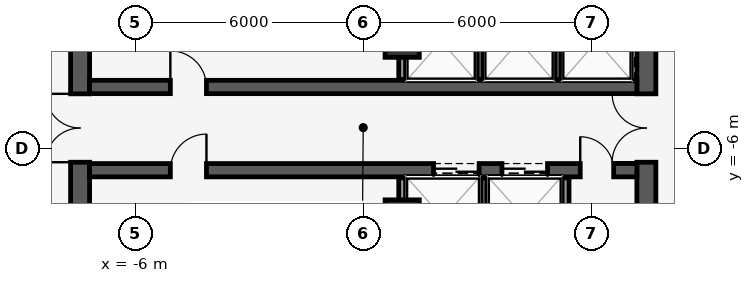
"""IFC4 building model, lengths in metres.
Left out: names, types, materials, properties, quantities, classifications, styles, units other than length and angle.
Written with IfcOpenShell. Run it as: python <this file> out.ifc"""

import sys

from ifc_helpers import new_model, si_unit, direction, frame, frame_2d, origin, origin_2d, place, context, subcontext, project, spatial, rectangle, extrude, element, fill, save


model = new_model("IFC4")
c1 = context("Model", 3, precision=1e-05, world=origin(), true_north=direction((0.0, 1.0)))
c2 = subcontext(c1, "Body", "Model", "MODEL_VIEW")
j1 = project(units=[si_unit("LENGTHUNIT", "METRE"), si_unit("PLANEANGLEUNIT", "RADIAN")], contexts=[c1])
p1 = place(None, origin())
s1 = spatial("IfcSite", under=j1, at=p1, CompositionType="ELEMENT")
p2 = place(p1, origin())
s2 = spatial("IfcBuilding", under=s1, at=p2, CompositionType="ELEMENT")
p3 = place(p2, frame((0.0, 0.0, 318.8)))
s3 = spatial("IfcBuildingStorey", under=s2, at=p3, CompositionType="ELEMENT", Elevation=318.8)
p4 = place(p3, frame((-7.45, -9.0, 0.0), z_axis=(0.0, 0.0, 1.0), x_axis=(0.0, 1.0, 0.0)))
e1 = element("IfcWall", 1, at=p4, inside=s3, PredefinedType="SHEAR", context=c2, shape_type="SweptSolid", body=[
    extrude(rectangle(XDim=9.1, YDim=0.5, at=frame_2d((4.55, 0.0))), origin(), (0.0, 0.0, 1.0), 4.32),
])
p5 = place(p4, frame((2.64, 0.0, 0.0)))
e2 = element("IfcOpeningElement", 2, at=p5, cuts=e1, PredefinedType="OPENING", context=c2, shape_type="SweptSolid", body=[
    extrude(rectangle(XDim=1.8, YDim=2.2, at=frame_2d((0.9, 1.1))), frame((0.0, 0.26, 0.0), z_axis=(0.0, -1.0, 0.0), x_axis=(1.0, 0.0, 0.0)), (0.0, 0.0, 1.0), 0.52),
])
p6 = place(p4, frame((7.55, 0.0, 0.0)))
e3 = element("IfcOpeningElement", 3, at=p6, cuts=e1, PredefinedType="OPENING", context=c2, shape_type="SweptSolid", body=[
    extrude(rectangle(XDim=1.2, YDim=2.15, at=frame_2d((0.6, 1.075))), frame((0.0, 0.26, 0.0), z_axis=(0.0, -1.0, 0.0), x_axis=(1.0, 0.0, 0.0)), (0.0, 0.0, 1.0), 0.52),
])
p7 = place(p3, frame((7.45, -9.0, 0.0), z_axis=(0.0, 0.0, 1.0), x_axis=(0.0, 1.0, 0.0)))
e4 = element("IfcWall", 4, at=p7, inside=s3, PredefinedType="SHEAR", context=c2, shape_type="SweptSolid", body=[
    extrude(rectangle(XDim=9.1, YDim=0.5, at=frame_2d((4.55, 0.0))), origin(), (0.0, 0.0, 1.0), 4.32),
])
p8 = place(p7, frame((2.64, 0.0, 0.0)))
e5 = element("IfcOpeningElement", 5, at=p8, cuts=e4, PredefinedType="OPENING", context=c2, shape_type="SweptSolid", body=[
    extrude(rectangle(XDim=1.8, YDim=2.2, at=frame_2d((0.9, 1.1))), frame((0.0, 0.26, 0.0), z_axis=(0.0, -1.0, 0.0), x_axis=(1.0, 0.0, 0.0)), (0.0, 0.0, 1.0), 0.52),
])
p9 = place(p7, frame((7.55, 0.0, 0.0)))
e6 = element("IfcOpeningElement", 6, at=p9, cuts=e4, PredefinedType="OPENING", context=c2, shape_type="SweptSolid", body=[
    extrude(rectangle(XDim=1.2, YDim=2.15, at=frame_2d((0.6, 1.075))), frame((0.0, 0.26, 0.0), z_axis=(0.0, -1.0, 0.0), x_axis=(1.0, 0.0, 0.0)), (0.0, 0.0, 1.0), 0.52),
])
p10 = place(p3, frame((-7.2, -4.38, 0.0), z_axis=(0.0, 0.0, 1.0), x_axis=(1.0, 0.0, 0.0)))
e7 = element("IfcWall", 7, at=p10, inside=s3, PredefinedType="SHEAR", context=c2, shape_type="SweptSolid", body=[
    extrude(rectangle(XDim=14.4, YDim=0.35, at=frame_2d((7.2, 0.0))), origin(), (0.0, 0.0, 1.0), 4.32),
])
p11 = place(p10, frame((2.125, 0.0, 0.0)))
e8 = element("IfcOpeningElement", 8, at=p11, cuts=e7, PredefinedType="OPENING", context=c2, shape_type="SweptSolid", body=[
    extrude(rectangle(XDim=0.95, YDim=2.15, at=frame_2d((0.475, 1.075))), frame((0.0, 0.185, 0.0), z_axis=(0.0, -1.0, 0.0), x_axis=(1.0, 0.0, 0.0)), (0.0, 0.0, 1.0), 0.37),
])
p12 = place(p3, frame((-7.2, -6.57, 0.0), z_axis=(0.0, 0.0, 1.0), x_axis=(1.0, 0.0, 0.0)))
e9 = element("IfcWall", 9, at=p12, inside=s3, PredefinedType="SHEAR", context=c2, shape_type="SweptSolid", body=[
    extrude(rectangle(XDim=14.4, YDim=0.35, at=frame_2d((7.2, 0.0))), origin(), (0.0, 0.0, 1.0), 4.32),
])
p13 = place(p12, frame((9.05, 0.0, 0.0)))
e10 = element("IfcOpeningElement", 10, at=p13, cuts=e9, PredefinedType="OPENING", context=c2, shape_type="SweptSolid", body=[
    extrude(rectangle(XDim=1.2, YDim=2.25, at=frame_2d((0.6, 1.125))), frame((0.0, 0.185, 0.0), z_axis=(0.0, -1.0, 0.0), x_axis=(1.0, 0.0, 0.0)), (0.0, 0.0, 1.0), 0.37),
])
p14 = place(p12, frame((10.85, 0.0, 0.0)))
e11 = element("IfcOpeningElement", 11, at=p14, cuts=e9, PredefinedType="OPENING", context=c2, shape_type="SweptSolid", body=[
    extrude(rectangle(XDim=1.2, YDim=2.25, at=frame_2d((0.6, 1.125))), frame((0.0, 0.185, 0.0), z_axis=(0.0, -1.0, 0.0), x_axis=(1.0, 0.0, 0.0)), (0.0, 0.0, 1.0), 0.37),
])
p15 = place(p12, frame((2.125, 0.0, 0.0)))
e12 = element("IfcOpeningElement", 12, at=p15, cuts=e9, PredefinedType="OPENING", context=c2, shape_type="SweptSolid", body=[
    extrude(rectangle(XDim=0.95, YDim=2.15, at=frame_2d((0.475, 1.075))), frame((0.0, 0.185, 0.0), z_axis=(0.0, -1.0, 0.0), x_axis=(1.0, 0.0, 0.0)), (0.0, 0.0, 1.0), 0.37),
])
p16 = place(p12, frame((12.91, 0.0, 0.0)))
e13 = element("IfcOpeningElement", 13, at=p16, cuts=e9, PredefinedType="OPENING", context=c2, shape_type="SweptSolid", body=[
    extrude(rectangle(XDim=0.88, YDim=2.15, at=frame_2d((0.44, 1.075))), frame((0.0, 0.185, 0.0), z_axis=(0.0, -1.0, 0.0), x_axis=(1.0, 0.0, 0.0)), (0.0, 0.0, 1.0), 0.37),
])
for number, where, z_axis, x_axis in (
    (14, (1.025, -3.15, 0.0), (0.0, 0.0, 1.0), (1.0, 0.0, 0.0)),
    (15, (1.025, -7.8, 0.0), (0.0, 0.0, 1.0), (1.0, 0.0, 0.0)),
):
    element("IfcColumn", number, at=place(p3, frame(where, z_axis=z_axis, x_axis=x_axis)), inside=s3, PredefinedType="COLUMN", context=c2, shape_type="SweptSolid", body=[
        extrude(rectangle(XDim=0.9, YDim=0.9, at=origin_2d()), origin(), (0.0, 0.0, 1.0), 4.6),
    ])
p17 = place(p3, frame((25.8, 9.083, 0.0), z_axis=(0.0, 0.0, 1.0), x_axis=(-0.55919392155, -0.829036885851, 0.0)))
e16 = element("IfcWall", 16, at=p17, inside=s3, PredefinedType="STANDARD", context=c2, shape_type="SweptSolid", body=[
    extrude(rectangle(XDim=43.915, YDim=0.28, at=frame_2d((21.958, 0.0))), origin(), (0.0, 0.0, 1.0), 4.32),
])
p18 = place(p17, frame((21.457, 0.0, 0.0)))
e17 = element("IfcOpeningElement", 17, at=p18, cuts=e16, PredefinedType="OPENING", context=c2, shape_type="SweptSolid", body=[
    extrude(rectangle(XDim=1.0, YDim=2.15, at=frame_2d((0.5, 1.075))), frame((0.0, 0.15, 0.0), z_axis=(0.0, -1.0, 0.0), x_axis=(1.0, 0.0, 0.0)), (0.0, 0.0, 1.0), 0.3),
])
p19 = place(p17, frame((4.257, 0.0, 0.85)))
e18 = element("IfcOpeningElement", 18, at=p19, cuts=e16, PredefinedType="OPENING", context=c2, shape_type="SweptSolid", body=[
    extrude(rectangle(XDim=1.8, YDim=2.4, at=frame_2d((0.9, 1.2))), frame((0.0, 0.15, 0.0), z_axis=(0.0, -1.0, 0.0), x_axis=(1.0, 0.0, 0.0)), (0.0, 0.0, 1.0), 0.3),
])
p20 = place(p17, frame((9.857, 0.0, 0.85)))
e19 = element("IfcOpeningElement", 19, at=p20, cuts=e16, PredefinedType="OPENING", context=c2, shape_type="SweptSolid", body=[
    extrude(rectangle(XDim=1.8, YDim=2.4, at=frame_2d((0.9, 1.2))), frame((0.0, 0.15, 0.0), z_axis=(0.0, -1.0, 0.0), x_axis=(1.0, 0.0, 0.0)), (0.0, 0.0, 1.0), 0.3),
])
p21 = place(p17, frame((32.257, 0.0, 0.85)))
e20 = element("IfcOpeningElement", 20, at=p21, cuts=e16, PredefinedType="OPENING", context=c2, shape_type="SweptSolid", body=[
    extrude(rectangle(XDim=1.8, YDim=2.4, at=frame_2d((0.9, 1.2))), frame((0.0, 0.15, 0.0), z_axis=(0.0, -1.0, 0.0), x_axis=(1.0, 0.0, 0.0)), (0.0, 0.0, 1.0), 0.3),
])
p22 = place(p17, frame((37.857, 0.0, 0.85)))
e21 = element("IfcOpeningElement", 21, at=p22, cuts=e16, PredefinedType="OPENING", context=c2, shape_type="SweptSolid", body=[
    extrude(rectangle(XDim=1.8, YDim=2.4, at=frame_2d((0.9, 1.2))), frame((0.0, 0.15, 0.0), z_axis=(0.0, -1.0, 0.0), x_axis=(1.0, 0.0, 0.0)), (0.0, 0.0, 1.0), 0.3),
])
p23 = place(p3, frame((-4.988, -26.865, 0.0), z_axis=(0.0, 0.0, 1.0), x_axis=(-0.431592936847, 0.902068476815, 0.0)))
e22 = element("IfcWall", 22, at=p23, inside=s3, PredefinedType="STANDARD", context=c2, shape_type="SweptSolid", body=[
    extrude(rectangle(XDim=43.18, YDim=0.28, at=frame_2d((21.59, 0.0))), origin(), (0.0, 0.0, 1.0), 4.32),
])
p24 = place(p23, frame((18.499, 0.0, 0.0)))
e23 = element("IfcOpeningElement", 23, at=p24, cuts=e22, PredefinedType="OPENING", context=c2, shape_type="SweptSolid", body=[
    extrude(rectangle(XDim=1.0, YDim=2.15, at=frame_2d((0.5, 1.075))), frame((0.0, 0.15, 0.0), z_axis=(0.0, -1.0, 0.0), x_axis=(1.0, 0.0, 0.0)), (0.0, 0.0, 1.0), 0.3),
])
p25 = place(p23, frame((9.49, 0.0, 0.85)))
e24 = element("IfcOpeningElement", 24, at=p25, cuts=e22, PredefinedType="OPENING", context=c2, shape_type="SweptSolid", body=[
    extrude(rectangle(XDim=1.8, YDim=2.4, at=frame_2d((0.9, 1.2))), frame((0.0, 0.15, 0.0), z_axis=(0.0, -1.0, 0.0), x_axis=(1.0, 0.0, 0.0)), (0.0, 0.0, 1.0), 0.3),
])
p26 = place(p23, frame((31.89, 0.0, 0.85)))
e25 = element("IfcOpeningElement", 25, at=p26, cuts=e22, PredefinedType="OPENING", context=c2, shape_type="SweptSolid", body=[
    extrude(rectangle(XDim=1.8, YDim=2.4, at=frame_2d((0.9, 1.2))), frame((0.0, 0.15, 0.0), z_axis=(0.0, -1.0, 0.0), x_axis=(1.0, 0.0, 0.0)), (0.0, 0.0, 1.0), 0.3),
])
p27 = place(p23, frame((37.49, 0.0, 0.85)))
e26 = element("IfcOpeningElement", 26, at=p27, cuts=e22, PredefinedType="OPENING", context=c2, shape_type="SweptSolid", body=[
    extrude(rectangle(XDim=1.8, YDim=2.4, at=frame_2d((0.9, 1.2))), frame((0.0, 0.15, 0.0), z_axis=(0.0, -1.0, 0.0), x_axis=(1.0, 0.0, 0.0)), (0.0, 0.0, 1.0), 0.3),
])
p28 = place(p3, frame((1.025, -4.18, 0.0), z_axis=(0.0, 0.0, 1.0), x_axis=(0.0, 1.0, 0.0)))
e27 = element("IfcWall", 27, at=p28, inside=s3, PredefinedType="PARTITIONING", context=c2, shape_type="SweptSolid", body=[
    extrude(rectangle(XDim=2.03, YDim=0.18, at=frame_2d((1.015, 0.0))), origin(), (0.0, 0.0, 1.0), 3.368),
])
for number, where, z_axis, x_axis in (
    (28, (3.075, -4.18, 0.0), (0.0, 0.0, 1.0), (0.0, 1.0, 0.0)),
    (29, (5.125, -4.18, 0.0), (0.0, 0.0, 1.0), (0.0, 1.0, 0.0)),
):
    element("IfcWall", number, at=place(p3, frame(where, z_axis=z_axis, x_axis=x_axis)), inside=s3, PredefinedType="PARTITIONING", context=c2, shape_type="SweptSolid", body=[
        extrude(rectangle(XDim=2.03, YDim=0.15, at=frame_2d((1.015, 0.0))), origin(), (0.0, 0.0, 1.0), 4.32),
    ])
p29 = place(p3, frame((1.025, -8.85, 0.0), z_axis=(0.0, 0.0, 1.0), x_axis=(0.0, 1.0, 0.0)))
e30 = element("IfcWall", 30, at=p29, inside=s3, PredefinedType="PARTITIONING", context=c2, shape_type="SweptSolid", body=[
    extrude(rectangle(XDim=2.08, YDim=0.18, at=frame_2d((1.04, 0.0))), origin(), (0.0, 0.0, 1.0), 3.368),
])
p30 = place(p3, frame((3.175, -8.85, 0.0), z_axis=(0.0, 0.0, 1.0), x_axis=(0.0, 1.0, 0.0)))
e31 = element("IfcWall", 31, at=p30, inside=s3, PredefinedType="PARTITIONING", context=c2, shape_type="SweptSolid", body=[
    extrude(rectangle(XDim=2.08, YDim=0.15, at=frame_2d((1.04, 0.0))), origin(), (0.0, 0.0, 1.0), 4.32),
])
p31 = place(p3, frame((5.325, -8.85, 0.0), z_axis=(0.0, 0.0, 1.0), x_axis=(0.0, 1.0, 0.0)))
e32 = element("IfcWall", 32, at=p31, inside=s3, PredefinedType="PARTITIONING", context=c2, shape_type="SweptSolid", body=[
    extrude(rectangle(XDim=2.08, YDim=0.18, at=frame_2d((1.04, 0.0))), origin(), (0.0, 0.0, 1.0), 4.32),
])
p32 = place(p13, origin())
e33 = element("IfcDoor", 33, at=p32, inside=s3, OperationType="DOUBLE_DOOR_SLIDING", PredefinedType="DOOR", context=c2, shape_type="SweptSolid", body=[
    extrude(rectangle(XDim=1.2, YDim=2.25, at=frame_2d((0.6, 1.125))), frame((0.0, 0.025, 0.0), z_axis=(0.0, -1.0, 0.0), x_axis=(1.0, 0.0, 0.0)), (0.0, 0.0, 1.0), 0.05),
])
fill(e10, e33)
p33 = place(p14, origin())
e34 = element("IfcDoor", 34, at=p33, inside=s3, OperationType="DOUBLE_DOOR_SLIDING", PredefinedType="DOOR", context=c2, shape_type="SweptSolid", body=[
    extrude(rectangle(XDim=1.2, YDim=2.25, at=frame_2d((0.6, 1.125))), frame((0.0, 0.025, 0.0), z_axis=(0.0, -1.0, 0.0), x_axis=(1.0, 0.0, 0.0)), (0.0, 0.0, 1.0), 0.05),
])
fill(e11, e34)
p34 = place(p5, origin())
e35 = element("IfcDoor", 35, at=p34, inside=s3, OperationType="DOUBLE_DOOR_SINGLE_SWING", PredefinedType="DOOR", context=c2, shape_type="SweptSolid", body=[
    extrude(rectangle(XDim=1.8, YDim=2.2, at=frame_2d((0.9, 1.1))), frame((0.0, 0.025, 0.0), z_axis=(0.0, -1.0, 0.0), x_axis=(1.0, 0.0, 0.0)), (0.0, 0.0, 1.0), 0.05),
])
fill(e2, e35)
p35 = place(p8, origin())
e36 = element("IfcDoor", 36, at=p35, inside=s3, OperationType="DOUBLE_DOOR_SINGLE_SWING", PredefinedType="DOOR", context=c2, shape_type="SweptSolid", body=[
    extrude(rectangle(XDim=1.8, YDim=2.2, at=frame_2d((0.9, 1.1))), frame((0.0, 0.025, 0.0), z_axis=(0.0, -1.0, 0.0), x_axis=(1.0, 0.0, 0.0)), (0.0, 0.0, 1.0), 0.05),
])
fill(e5, e36)
p36 = place(p11, origin())
e37 = element("IfcDoor", 37, at=p36, inside=s3, OperationType="SINGLE_SWING_LEFT", PredefinedType="DOOR", context=c2, shape_type="SweptSolid", body=[
    extrude(rectangle(XDim=0.95, YDim=2.15, at=frame_2d((0.475, 1.075))), frame((0.0, 0.025, 0.0), z_axis=(0.0, -1.0, 0.0), x_axis=(1.0, 0.0, 0.0)), (0.0, 0.0, 1.0), 0.05),
])
fill(e8, e37)
p37 = place(p15, origin())
e38 = element("IfcDoor", 38, at=p37, inside=s3, OperationType="SINGLE_SWING_RIGHT", PredefinedType="DOOR", context=c2, shape_type="SweptSolid", body=[
    extrude(rectangle(XDim=0.95, YDim=2.15, at=frame_2d((0.475, 1.075))), frame((0.0, 0.025, 0.0), z_axis=(0.0, -1.0, 0.0), x_axis=(1.0, 0.0, 0.0)), (0.0, 0.0, 1.0), 0.05),
])
fill(e12, e38)
p38 = place(p16, origin())
e39 = element("IfcDoor", 39, at=p38, inside=s3, OperationType="SINGLE_SWING_LEFT", PredefinedType="DOOR", context=c2, shape_type="SweptSolid", body=[
    extrude(rectangle(XDim=0.88, YDim=2.15, at=frame_2d((0.44, 1.075))), frame((0.0, 0.025, 0.0), z_axis=(0.0, -1.0, 0.0), x_axis=(1.0, 0.0, 0.0)), (0.0, 0.0, 1.0), 0.05),
])
fill(e13, e39)
save(model, sys.argv[1])
